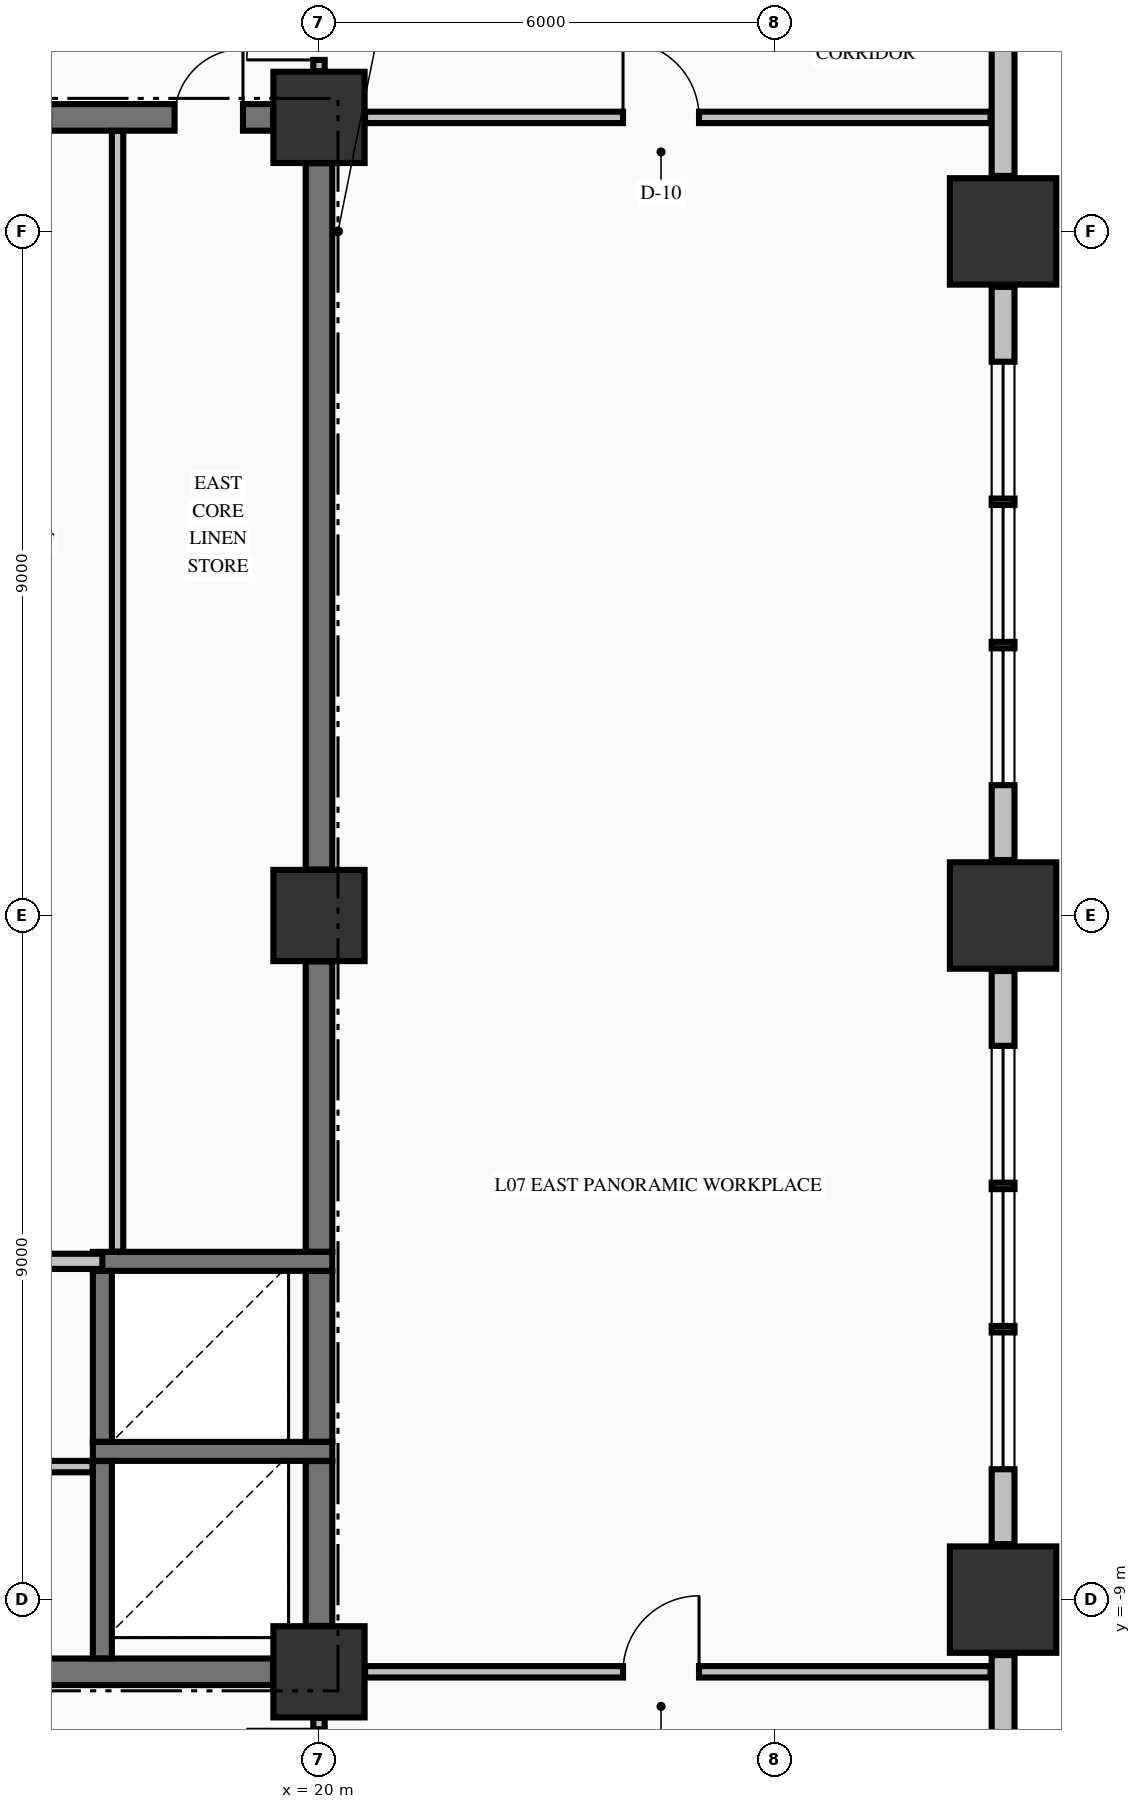
"""IFC4 building model, lengths in metres.
Left out: names, types, materials, properties, quantities, classifications, styles, units other than length and angle.
Written with IfcOpenShell. Run it as: python <this file> out.ifc"""

import sys

from ifc_helpers import new_model, si_unit, direction, frame, frame_2d, origin, origin_2d, place, context, subcontext, project, spatial, rectangle, extrude, element, fill, save


model = new_model("IFC4")
c1 = context("Model", 3, precision=1e-05, world=origin(), true_north=direction((0.0, 1.0)))
c2 = subcontext(c1, "Body", "Model", "MODEL_VIEW")
j1 = project(units=[si_unit("LENGTHUNIT", "METRE"), si_unit("PLANEANGLEUNIT", "RADIAN")], contexts=[c1])
p1 = place(None, origin())
s1 = spatial("IfcSite", under=j1, at=p1, CompositionType="ELEMENT")
p2 = place(p1, origin())
s2 = spatial("IfcBuilding", under=s1, at=p2, CompositionType="ELEMENT")
p3 = place(p2, frame((0.0, 0.0, 34.34)))
s3 = spatial("IfcBuildingStorey", under=s2, at=p3, CompositionType="ELEMENT", Elevation=34.34)
for number, where, z_axis, x_axis in (
    (1, (29.0, -9.0, -0.3), (0.0, 0.0, 1.0), (1.0, 0.0, 0.0)),
    (2, (29.0, 0.0, -0.3), (0.0, 0.0, 1.0), (1.0, 0.0, 0.0)),
    (3, (29.0, 9.0, -0.3), (0.0, 0.0, 1.0), (1.0, 0.0, 0.0)),
):
    element("IfcColumn", number, at=place(p3, frame(where, z_axis=z_axis, x_axis=x_axis)), inside=s3, PredefinedType="COLUMN", context=c2, shape_type="SweptSolid", body=[
        extrude(rectangle(XDim=1.4, YDim=1.4, at=origin_2d()), origin(), (0.0, 0.0, 1.0), 3.62),
    ])
for number, where, z_axis, x_axis in (
    (4, (20.0, -9.95, -0.3), (0.0, 0.0, 1.0), (1.0, 0.0, 0.0)),
    (5, (20.0, 10.5, -0.3), (0.0, 0.0, 1.0), (1.0, 0.0, 0.0)),
    (6, (20.0, 0.0, -0.3), (0.0, 0.0, 1.0), (1.0, 0.0, 0.0)),
):
    element("IfcColumn", number, at=place(p3, frame(where, z_axis=z_axis, x_axis=x_axis)), inside=s3, PredefinedType="COLUMN", context=c2, shape_type="SweptSolid", body=[
        extrude(rectangle(XDim=1.2, YDim=1.2, at=origin_2d()), origin(), (0.0, 0.0, 1.0), 3.62),
    ])
p4 = place(p3, frame((29.0, -22.27, 0.0), z_axis=(0.0, 0.0, 1.0), x_axis=(0.0, 1.0, 0.0)))
e7 = element("IfcWall", 7, at=p4, inside=s3, PredefinedType="STANDARD", context=c2, shape_type="SweptSolid", body=[
    extrude(rectangle(XDim=12.54, YDim=0.3, at=frame_2d((6.27, 0.0))), origin(), (0.0, 0.0, 1.0), 2.712),
])
p5 = place(p3, frame((29.0, -8.27, 0.0), z_axis=(0.0, 0.0, 1.0), x_axis=(0.0, 1.0, 0.0)))
e8 = element("IfcWall", 8, at=p5, inside=s3, PredefinedType="STANDARD", context=c2, shape_type="SweptSolid", body=[
    extrude(rectangle(XDim=7.54, YDim=0.3, at=frame_2d((3.77, 0.0))), origin(), (0.0, 0.0, 1.0), 2.712),
])
p6 = place(p5, frame((0.985, 0.0, 0.78)))
e9 = element("IfcOpeningElement", 9, at=p6, cuts=e8, PredefinedType="OPENING", context=c2, shape_type="SweptSolid", body=[
    extrude(rectangle(XDim=1.8, YDim=1.72, at=frame_2d((0.9, 0.86))), frame((0.0, 0.16, 0.0), z_axis=(0.0, -1.0, 0.0), x_axis=(1.0, 0.0, 0.0)), (0.0, 0.0, 1.0), 0.32),
])
p7 = place(p5, frame((2.87, 0.0, 0.78)))
e10 = element("IfcOpeningElement", 10, at=p7, cuts=e8, PredefinedType="OPENING", context=c2, shape_type="SweptSolid", body=[
    extrude(rectangle(XDim=1.8, YDim=1.72, at=frame_2d((0.9, 0.86))), frame((0.0, 0.16, 0.0), z_axis=(0.0, -1.0, 0.0), x_axis=(1.0, 0.0, 0.0)), (0.0, 0.0, 1.0), 0.32),
])
p8 = place(p5, frame((4.755, 0.0, 0.78)))
e11 = element("IfcOpeningElement", 11, at=p8, cuts=e8, PredefinedType="OPENING", context=c2, shape_type="SweptSolid", body=[
    extrude(rectangle(XDim=1.8, YDim=1.72, at=frame_2d((0.9, 0.86))), frame((0.0, 0.16, 0.0), z_axis=(0.0, -1.0, 0.0), x_axis=(1.0, 0.0, 0.0)), (0.0, 0.0, 1.0), 0.32),
])
p9 = place(p3, frame((29.0, 0.73, 0.0), z_axis=(0.0, 0.0, 1.0), x_axis=(0.0, 1.0, 0.0)))
e12 = element("IfcWall", 12, at=p9, inside=s3, PredefinedType="STANDARD", context=c2, shape_type="SweptSolid", body=[
    extrude(rectangle(XDim=7.54, YDim=0.3, at=frame_2d((3.77, 0.0))), origin(), (0.0, 0.0, 1.0), 2.712),
])
p10 = place(p9, frame((0.985, 0.0, 0.78)))
e13 = element("IfcOpeningElement", 13, at=p10, cuts=e12, PredefinedType="OPENING", context=c2, shape_type="SweptSolid", body=[
    extrude(rectangle(XDim=1.8, YDim=1.72, at=frame_2d((0.9, 0.86))), frame((0.0, 0.16, 0.0), z_axis=(0.0, -1.0, 0.0), x_axis=(1.0, 0.0, 0.0)), (0.0, 0.0, 1.0), 0.32),
])
p11 = place(p9, frame((2.87, 0.0, 0.78)))
e14 = element("IfcOpeningElement", 14, at=p11, cuts=e12, PredefinedType="OPENING", context=c2, shape_type="SweptSolid", body=[
    extrude(rectangle(XDim=1.8, YDim=1.72, at=frame_2d((0.9, 0.86))), frame((0.0, 0.16, 0.0), z_axis=(0.0, -1.0, 0.0), x_axis=(1.0, 0.0, 0.0)), (0.0, 0.0, 1.0), 0.32),
])
p12 = place(p9, frame((4.755, 0.0, 0.78)))
e15 = element("IfcOpeningElement", 15, at=p12, cuts=e12, PredefinedType="OPENING", context=c2, shape_type="SweptSolid", body=[
    extrude(rectangle(XDim=1.8, YDim=1.72, at=frame_2d((0.9, 0.86))), frame((0.0, 0.16, 0.0), z_axis=(0.0, -1.0, 0.0), x_axis=(1.0, 0.0, 0.0)), (0.0, 0.0, 1.0), 0.32),
])
p13 = place(p3, frame((29.0, 9.73, 0.0), z_axis=(0.0, 0.0, 1.0), x_axis=(0.0, 1.0, 0.0)))
e16 = element("IfcWall", 16, at=p13, inside=s3, PredefinedType="STANDARD", context=c2, shape_type="SweptSolid", body=[
    extrude(rectangle(XDim=12.54, YDim=0.3, at=frame_2d((6.27, 0.0))), origin(), (0.0, 0.0, 1.0), 2.712),
])
p14 = place(p3, frame((14.7, -9.95, 0.0), z_axis=(0.0, 0.0, 1.0), x_axis=(1.0, 0.0, 0.0)))
e17 = element("IfcWall", 17, at=p14, inside=s3, PredefinedType="SHEAR", context=c2, shape_type="SweptSolid", body=[
    extrude(rectangle(XDim=4.696, YDim=0.35, at=frame_2d((2.348, 0.0))), origin(), (0.0, 0.0, 1.0), 3.32),
])
p15 = place(p14, frame((0.8, 0.0, 0.0)))
e18 = element("IfcOpeningElement", 18, at=p15, cuts=e17, PredefinedType="OPENING", context=c2, shape_type="SweptSolid", body=[
    extrude(rectangle(XDim=0.9, YDim=2.15, at=frame_2d((0.45, 1.075))), frame((0.0, 0.185, 0.0), z_axis=(0.0, -1.0, 0.0), x_axis=(1.0, 0.0, 0.0)), (0.0, 0.0, 1.0), 0.37),
])
for number, where, z_axis, x_axis in (
    (19, (17.025, -7.05, 0.0), (0.0, 0.0, 1.0), (1.0, 0.0, 0.0)),
    (20, (17.025, -4.55, 0.0), (0.0, 0.0, 1.0), (1.0, 0.0, 0.0)),
):
    element("IfcWall", number, at=place(p3, frame(where, z_axis=z_axis, x_axis=x_axis)), inside=s3, PredefinedType="SOLIDWALL", context=c2, shape_type="SweptSolid", body=[
        extrude(rectangle(XDim=3.15, YDim=0.25, at=frame_2d((1.575, 0.0))), origin(), (0.0, 0.0, 1.0), 3.32),
    ])
p16 = place(p3, frame((14.7, 10.5, 0.0), z_axis=(0.0, 0.0, 1.0), x_axis=(1.0, 0.0, 0.0)))
e21 = element("IfcWall", 21, at=p16, inside=s3, PredefinedType="SHEAR", context=c2, shape_type="SweptSolid", body=[
    extrude(rectangle(XDim=4.696, YDim=0.35, at=frame_2d((2.348, 0.0))), origin(), (0.0, 0.0, 1.0), 3.32),
])
p17 = place(p16, frame((0.85, 0.0, 0.0)))
e22 = element("IfcOpeningElement", 22, at=p17, cuts=e21, PredefinedType="OPENING", context=c2, shape_type="SweptSolid", body=[
    extrude(rectangle(XDim=0.9, YDim=2.15, at=frame_2d((0.45, 1.075))), frame((0.0, 0.185, 0.0), z_axis=(0.0, -1.0, 0.0), x_axis=(1.0, 0.0, 0.0)), (0.0, 0.0, 1.0), 0.37),
])
p18 = place(p16, frame((3.4, 0.0, 0.0)))
e23 = element("IfcOpeningElement", 23, at=p18, cuts=e21, PredefinedType="OPENING", context=c2, shape_type="SweptSolid", body=[
    extrude(rectangle(XDim=0.9, YDim=2.15, at=frame_2d((0.45, 1.075))), frame((0.0, 0.185, 0.0), z_axis=(0.0, -1.0, 0.0), x_axis=(1.0, 0.0, 0.0)), (0.0, 0.0, 1.0), 0.37),
])
p19 = place(p3, frame((20.606, -9.95, 0.0), z_axis=(0.0, 0.0, 1.0), x_axis=(1.0, 0.0, 0.0)))
e24 = element("IfcWall", 24, at=p19, inside=s3, PredefinedType="PARTITIONING", context=c2, shape_type="SweptSolid", body=[
    extrude(rectangle(XDim=8.229, YDim=0.15, at=frame_2d((4.115, 0.0))), origin(), (0.0, 0.0, 1.0), 3.32),
])
p20 = place(p19, frame((3.394, 0.0, 0.0)))
e25 = element("IfcOpeningElement", 25, at=p20, cuts=e24, PredefinedType="OPENING", context=c2, shape_type="SweptSolid", body=[
    extrude(rectangle(XDim=1.0, YDim=2.15, at=frame_2d((0.5, 1.075))), frame((0.0, 0.085, 0.0), z_axis=(0.0, -1.0, 0.0), x_axis=(1.0, 0.0, 0.0)), (0.0, 0.0, 1.0), 0.17),
])
p21 = place(p3, frame((14.878, -7.25, 0.0), z_axis=(0.0, 0.0, 1.0), x_axis=(1.0, 0.0, 0.0)))
e26 = element("IfcWall", 26, at=p21, inside=s3, PredefinedType="PARTITIONING", context=c2, shape_type="SweptSolid", body=[
    extrude(rectangle(XDim=2.144, YDim=0.15, at=frame_2d((1.072, 0.0))), origin(), (0.0, 0.0, 1.0), 3.32),
])
p22 = place(p21, frame((0.597, 0.0, 0.0)))
e27 = element("IfcOpeningElement", 27, at=p22, cuts=e26, PredefinedType="OPENING", context=c2, shape_type="SweptSolid", body=[
    extrude(rectangle(XDim=0.95, YDim=2.15, at=frame_2d((0.475, 1.075))), frame((0.0, 0.085, 0.0), z_axis=(0.0, -1.0, 0.0), x_axis=(1.0, 0.0, 0.0)), (0.0, 0.0, 1.0), 0.17),
])
p23 = place(p3, frame((14.878, -4.55, 0.0), z_axis=(0.0, 0.0, 1.0), x_axis=(1.0, 0.0, 0.0)))
e28 = element("IfcWall", 28, at=p23, inside=s3, PredefinedType="PARTITIONING", context=c2, shape_type="SweptSolid", body=[
    extrude(rectangle(XDim=2.272, YDim=0.2, at=frame_2d((1.136, 0.0))), origin(), (0.0, 0.0, 1.0), 3.32),
])
p24 = place(p3, frame((20.606, 10.5, 0.0), z_axis=(0.0, 0.0, 1.0), x_axis=(1.0, 0.0, 0.0)))
e29 = element("IfcWall", 29, at=p24, inside=s3, PredefinedType="PARTITIONING", context=c2, shape_type="SweptSolid", body=[
    extrude(rectangle(XDim=8.229, YDim=0.15, at=frame_2d((4.115, 0.0))), origin(), (0.0, 0.0, 1.0), 3.32),
])
p25 = place(p24, frame((3.394, 0.0, 0.0)))
e30 = element("IfcOpeningElement", 30, at=p25, cuts=e29, PredefinedType="OPENING", context=c2, shape_type="SweptSolid", body=[
    extrude(rectangle(XDim=1.0, YDim=2.15, at=frame_2d((0.5, 1.075))), frame((0.0, 0.085, 0.0), z_axis=(0.0, -1.0, 0.0), x_axis=(1.0, 0.0, 0.0)), (0.0, 0.0, 1.0), 0.17),
])
p26 = place(p3, frame((17.15, -9.773, 0.0), z_axis=(0.0, 0.0, 1.0), x_axis=(0.0, 1.0, 0.0)))
e31 = element("IfcWall", 31, at=p26, inside=s3, PredefinedType="SOLIDWALL", context=c2, shape_type="SweptSolid", body=[
    extrude(rectangle(XDim=2.596, YDim=0.25, at=frame_2d((1.298, 0.0))), origin(), (0.0, 0.0, 1.0), 3.32),
])
p27 = place(p3, frame((17.15, -6.923, 0.0), z_axis=(0.0, 0.0, 1.0), x_axis=(0.0, 1.0, 0.0)))
e32 = element("IfcWall", 32, at=p27, inside=s3, PredefinedType="SOLIDWALL", context=c2, shape_type="SweptSolid", body=[
    extrude(rectangle(XDim=2.246, YDim=0.25, at=frame_2d((1.123, 0.0))), origin(), (0.0, 0.0, 1.0), 3.32),
])
p28 = place(p3, frame((20.0, -9.346, 0.0), z_axis=(0.0, 0.0, 1.0), x_axis=(0.0, 1.0, 0.0)))
e33 = element("IfcWall", 33, at=p28, inside=s3, PredefinedType="SHEAR", context=c2, shape_type="SweptSolid", body=[
    extrude(rectangle(XDim=2.169, YDim=0.35, at=frame_2d((1.084, 0.0))), origin(), (0.0, 0.0, 1.0), 3.32),
])
p29 = place(p3, frame((20.0, -6.923, 0.0), z_axis=(0.0, 0.0, 1.0), x_axis=(0.0, 1.0, 0.0)))
e34 = element("IfcWall", 34, at=p29, inside=s3, PredefinedType="SHEAR", context=c2, shape_type="SweptSolid", body=[
    extrude(rectangle(XDim=2.246, YDim=0.35, at=frame_2d((1.123, 0.0))), origin(), (0.0, 0.0, 1.0), 3.32),
])
p30 = place(p3, frame((20.0, -4.423, 0.0), z_axis=(0.0, 0.0, 1.0), x_axis=(0.0, 1.0, 0.0)))
e35 = element("IfcWall", 35, at=p30, inside=s3, PredefinedType="SHEAR", context=c2, shape_type="SweptSolid", body=[
    extrude(rectangle(XDim=3.819, YDim=0.35, at=frame_2d((1.91, 0.0))), origin(), (0.0, 0.0, 1.0), 3.32),
])
p31 = place(p3, frame((20.0, 0.604, 0.0), z_axis=(0.0, 0.0, 1.0), x_axis=(0.0, 1.0, 0.0)))
e36 = element("IfcWall", 36, at=p31, inside=s3, PredefinedType="SHEAR", context=c2, shape_type="SweptSolid", body=[
    extrude(rectangle(XDim=9.292, YDim=0.35, at=frame_2d((4.646, 0.0))), origin(), (0.0, 0.0, 1.0), 3.32),
])
p32 = place(p3, frame((17.35, -4.422, 0.0), z_axis=(0.0, 0.0, 1.0), x_axis=(0.0, 1.0, 0.0)))
e37 = element("IfcWall", 37, at=p32, inside=s3, PredefinedType="PARTITIONING", context=c2, shape_type="SweptSolid", body=[
    extrude(rectangle(XDim=14.744, YDim=0.15, at=frame_2d((7.372, 0.0))), origin(), (0.0, 0.0, 1.0), 3.32),
])
p33 = place(p3, frame((20.0, -12.122, 0.0), z_axis=(0.0, 0.0, 1.0), x_axis=(0.0, 1.0, 0.0)))
e38 = element("IfcWall", 38, at=p33, inside=s3, PredefinedType="PARTITIONING", context=c2, shape_type="SweptSolid", body=[
    extrude(rectangle(XDim=1.566, YDim=0.15, at=frame_2d((0.783, 0.0))), origin(), (0.0, 0.0, 1.0), 2.66),
])
p34 = place(p33, frame((0.466, 0.0, 0.0)))
e39 = element("IfcOpeningElement", 39, at=p34, cuts=e38, PredefinedType="OPENING", context=c2, shape_type="SweptSolid", body=[
    extrude(rectangle(XDim=0.95, YDim=2.15, at=frame_2d((0.475, 1.075))), frame((0.0, 0.085, 0.0), z_axis=(0.0, -1.0, 0.0), x_axis=(1.0, 0.0, 0.0)), (0.0, 0.0, 1.0), 0.17),
])
p35 = place(p3, frame((20.0, 11.106, 0.0), z_axis=(0.0, 0.0, 1.0), x_axis=(0.0, 1.0, 0.0)))
e40 = element("IfcWall", 40, at=p35, inside=s3, PredefinedType="PARTITIONING", context=c2, shape_type="SweptSolid", body=[
    extrude(rectangle(XDim=1.366, YDim=0.15, at=frame_2d((0.683, 0.0))), origin(), (0.0, 0.0, 1.0), 2.66),
])
p36 = place(p35, frame((0.15, 0.0, 0.0)))
e41 = element("IfcOpeningElement", 41, at=p36, cuts=e40, PredefinedType="OPENING", context=c2, shape_type="SweptSolid", body=[
    extrude(rectangle(XDim=0.95, YDim=2.15, at=frame_2d((0.475, 1.075))), frame((0.0, 0.085, 0.0), z_axis=(0.0, -1.0, 0.0), x_axis=(1.0, 0.0, 0.0)), (0.0, 0.0, 1.0), 0.17),
])
p37 = place(p6, origin())
e42 = element("IfcWindow", 42, at=p37, inside=s3, PartitioningType="SINGLE_PANEL", PredefinedType="WINDOW", context=c2, shape_type="SweptSolid", body=[
    extrude(rectangle(XDim=1.8, YDim=1.72, at=frame_2d((0.9, 0.86))), frame((0.0, 0.03, 0.0), z_axis=(0.0, -1.0, 0.0), x_axis=(1.0, 0.0, 0.0)), (0.0, 0.0, 1.0), 0.06),
])
fill(e9, e42)
p38 = place(p7, origin())
e43 = element("IfcWindow", 43, at=p38, inside=s3, PartitioningType="SINGLE_PANEL", PredefinedType="WINDOW", context=c2, shape_type="SweptSolid", body=[
    extrude(rectangle(XDim=1.8, YDim=1.72, at=frame_2d((0.9, 0.86))), frame((0.0, 0.03, 0.0), z_axis=(0.0, -1.0, 0.0), x_axis=(1.0, 0.0, 0.0)), (0.0, 0.0, 1.0), 0.06),
])
fill(e10, e43)
p39 = place(p8, origin())
e44 = element("IfcWindow", 44, at=p39, inside=s3, PartitioningType="SINGLE_PANEL", PredefinedType="WINDOW", context=c2, shape_type="SweptSolid", body=[
    extrude(rectangle(XDim=1.8, YDim=1.72, at=frame_2d((0.9, 0.86))), frame((0.0, 0.03, 0.0), z_axis=(0.0, -1.0, 0.0), x_axis=(1.0, 0.0, 0.0)), (0.0, 0.0, 1.0), 0.06),
])
fill(e11, e44)
p40 = place(p10, origin())
e45 = element("IfcWindow", 45, at=p40, inside=s3, PartitioningType="SINGLE_PANEL", PredefinedType="WINDOW", context=c2, shape_type="SweptSolid", body=[
    extrude(rectangle(XDim=1.8, YDim=1.72, at=frame_2d((0.9, 0.86))), frame((0.0, 0.03, 0.0), z_axis=(0.0, -1.0, 0.0), x_axis=(1.0, 0.0, 0.0)), (0.0, 0.0, 1.0), 0.06),
])
fill(e13, e45)
p41 = place(p11, origin())
e46 = element("IfcWindow", 46, at=p41, inside=s3, PartitioningType="SINGLE_PANEL", PredefinedType="WINDOW", context=c2, shape_type="SweptSolid", body=[
    extrude(rectangle(XDim=1.8, YDim=1.72, at=frame_2d((0.9, 0.86))), frame((0.0, 0.03, 0.0), z_axis=(0.0, -1.0, 0.0), x_axis=(1.0, 0.0, 0.0)), (0.0, 0.0, 1.0), 0.06),
])
fill(e14, e46)
p42 = place(p12, origin())
e47 = element("IfcWindow", 47, at=p42, inside=s3, PartitioningType="SINGLE_PANEL", PredefinedType="WINDOW", context=c2, shape_type="SweptSolid", body=[
    extrude(rectangle(XDim=1.8, YDim=1.72, at=frame_2d((0.9, 0.86))), frame((0.0, 0.03, 0.0), z_axis=(0.0, -1.0, 0.0), x_axis=(1.0, 0.0, 0.0)), (0.0, 0.0, 1.0), 0.06),
])
fill(e15, e47)
p43 = place(p18, origin())
e48 = element("IfcDoor", 48, at=p43, inside=s3, OperationType="SINGLE_SWING_RIGHT", PredefinedType="DOOR", context=c2, shape_type="SweptSolid", body=[
    extrude(rectangle(XDim=0.9, YDim=2.15, at=frame_2d((0.45, 1.075))), frame((0.0, 0.025, 0.0), z_axis=(0.0, -1.0, 0.0), x_axis=(1.0, 0.0, 0.0)), (0.0, 0.0, 1.0), 0.05),
])
fill(e23, e48)
p44 = place(p36, origin())
e49 = element("IfcDoor", 49, at=p44, inside=s3, OperationType="SINGLE_SWING_LEFT", PredefinedType="DOOR", context=c2, shape_type="SweptSolid", body=[
    extrude(rectangle(XDim=0.95, YDim=2.15, at=frame_2d((0.475, 1.075))), frame((0.0, 0.025, 0.0), z_axis=(0.0, -1.0, 0.0), x_axis=(1.0, 0.0, 0.0)), (0.0, 0.0, 1.0), 0.05),
])
fill(e41, e49)
p45 = place(p34, origin())
e50 = element("IfcDoor", 50, at=p45, inside=s3, OperationType="SINGLE_SWING_RIGHT", PredefinedType="DOOR", context=c2, shape_type="SweptSolid", body=[
    extrude(rectangle(XDim=0.95, YDim=2.15, at=frame_2d((0.475, 1.075))), frame((0.0, 0.025, 0.0), z_axis=(0.0, -1.0, 0.0), x_axis=(1.0, 0.0, 0.0)), (0.0, 0.0, 1.0), 0.05),
])
fill(e39, e50)
p46 = place(p25, origin())
e51 = element("IfcDoor", 51, at=p46, inside=s3, OperationType="SINGLE_SWING_LEFT", PredefinedType="DOOR", context=c2, shape_type="SweptSolid", body=[
    extrude(rectangle(XDim=1.0, YDim=2.15, at=frame_2d((0.5, 1.075))), frame((0.0, 0.025, 0.0), z_axis=(0.0, -1.0, 0.0), x_axis=(1.0, 0.0, 0.0)), (0.0, 0.0, 1.0), 0.05),
])
fill(e30, e51)
p47 = place(p20, origin())
e52 = element("IfcDoor", 52, at=p47, inside=s3, OperationType="SINGLE_SWING_RIGHT", PredefinedType="DOOR", context=c2, shape_type="SweptSolid", body=[
    extrude(rectangle(XDim=1.0, YDim=2.15, at=frame_2d((0.5, 1.075))), frame((0.0, 0.025, 0.0), z_axis=(0.0, -1.0, 0.0), x_axis=(1.0, 0.0, 0.0)), (0.0, 0.0, 1.0), 0.05),
])
fill(e25, e52)
save(model, sys.argv[1])
